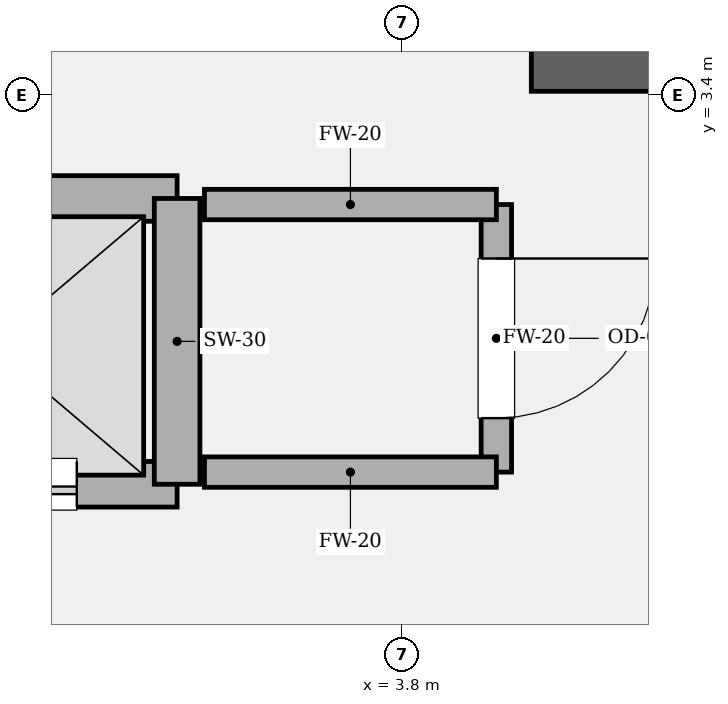
"""IFC4 building model, lengths in metres.
Left out: names, types, materials, properties, quantities, classifications, styles, units other than length and angle.
Written with IfcOpenShell. Run it as: python <this file> out.ifc"""

import sys

from ifc_helpers import new_model, si_unit, direction, frame, frame_2d, origin, place, context, subcontext, project, spatial, rectangle, extrude, element, fill, save


model = new_model("IFC4")
c1 = context("Model", 3, precision=1e-05, world=origin(), true_north=direction((0.0, 1.0)))
c2 = subcontext(c1, "Body", "Model", "MODEL_VIEW")
j1 = project(units=[si_unit("LENGTHUNIT", "METRE"), si_unit("PLANEANGLEUNIT", "RADIAN")], contexts=[c1])
p1 = place(None, origin())
s1 = spatial("IfcSite", under=j1, at=p1, CompositionType="ELEMENT")
p2 = place(p1, origin())
s2 = spatial("IfcBuilding", under=s1, at=p2, CompositionType="ELEMENT")
p3 = place(p2, frame((0.0, 0.0, 246.6)))
s3 = spatial("IfcBuildingStorey", under=s2, at=p3, CompositionType="ELEMENT", Elevation=246.6)
p4 = place(p3, frame((4.65, 3.6, 0.0), z_axis=(0.0, 0.0, 1.0), x_axis=(1.0, 0.0, 0.0)))
e1 = element("IfcWall", 1, at=p4, inside=s3, PredefinedType="SOLIDWALL", context=c2, shape_type="SweptSolid", body=[
    extrude(rectangle(XDim=5.275, YDim=0.35, at=frame_2d((2.638, 0.0))), origin(), (0.0, 0.0, 1.0), 4.8),
])
p5 = place(p3, frame((-2.32, 0.84, 0.0), z_axis=(0.0, 0.0, 1.0), x_axis=(1.0, 0.0, 0.0)))
e2 = element("IfcWall", 2, at=p5, inside=s3, PredefinedType="SOLIDWALL", context=c2, shape_type="SweptSolid", body=[
    extrude(rectangle(XDim=4.64, YDim=0.3, at=frame_2d((2.32, 0.0))), origin(), (0.0, 0.0, 1.0), 4.52),
])
p6 = place(p5, frame((0.66, 0.0, 0.0)))
e3 = element("IfcOpeningElement", 3, at=p6, cuts=e2, PredefinedType="OPENING", context=c2, shape_type="SweptSolid", body=[
    extrude(rectangle(XDim=1.12, YDim=2.25, at=frame_2d((0.56, 1.125))), frame((0.0, 0.16, 0.0), z_axis=(0.0, -1.0, 0.0), x_axis=(1.0, 0.0, 0.0)), (0.0, 0.0, 1.0), 0.32),
])
p7 = place(p5, frame((2.86, 0.0, 0.0)))
e4 = element("IfcOpeningElement", 4, at=p7, cuts=e2, PredefinedType="OPENING", context=c2, shape_type="SweptSolid", body=[
    extrude(rectangle(XDim=1.12, YDim=2.25, at=frame_2d((0.56, 1.125))), frame((0.0, 0.16, 0.0), z_axis=(0.0, -1.0, 0.0), x_axis=(1.0, 0.0, 0.0)), (0.0, 0.0, 1.0), 0.32),
])
p8 = place(p3, frame((-2.32, 2.72, 0.0), z_axis=(0.0, 0.0, 1.0), x_axis=(1.0, 0.0, 0.0)))
e5 = element("IfcWall", 5, at=p8, inside=s3, PredefinedType="SOLIDWALL", context=c2, shape_type="SweptSolid", body=[
    extrude(rectangle(XDim=4.64, YDim=0.3, at=frame_2d((2.32, 0.0))), origin(), (0.0, 0.0, 1.0), 4.52),
])
p9 = place(p3, frame((2.32, 0.84, 0.0), z_axis=(0.0, 0.0, 1.0), x_axis=(0.0, 1.0, 0.0)))
e6 = element("IfcWall", 6, at=p9, inside=s3, PredefinedType="SOLIDWALL", context=c2, shape_type="SweptSolid", body=[
    extrude(rectangle(XDim=1.88, YDim=0.3, at=frame_2d((0.94, 0.0))), origin(), (0.0, 0.0, 1.0), 4.52),
])
p10 = place(p3, frame((4.42, 0.92, 0.0), z_axis=(0.0, 0.0, 1.0), x_axis=(0.0, 1.0, 0.0)))
e7 = element("IfcWall", 7, at=p10, inside=s3, PredefinedType="SOLIDWALL", context=c2, shape_type="SweptSolid", body=[
    extrude(rectangle(XDim=1.76, YDim=0.2, at=frame_2d((0.88, 0.0))), origin(), (0.0, 0.0, 1.0), 4.52),
])
p11 = place(p10, frame((0.355, 0.0, 0.0)))
e8 = element("IfcOpeningElement", 8, at=p11, cuts=e7, PredefinedType="OPENING", context=c2, shape_type="SweptSolid", body=[
    extrude(rectangle(XDim=1.05, YDim=2.2, at=frame_2d((0.525, 1.1))), frame((0.0, 0.11, 0.0), z_axis=(0.0, -1.0, 0.0), x_axis=(1.0, 0.0, 0.0)), (0.0, 0.0, 1.0), 0.22),
])
for number, where, z_axis, x_axis in (
    (9, (4.42, 2.68, 0.0), (0.0, 0.0, 1.0), (-1.0, 0.0, 0.0)),
    (10, (2.5, 0.92, 0.0), (0.0, 0.0, 1.0), (1.0, 0.0, 0.0)),
):
    element("IfcWall", number, at=place(p3, frame(where, z_axis=z_axis, x_axis=x_axis)), inside=s3, PredefinedType="SOLIDWALL", context=c2, shape_type="SweptSolid", body=[
        extrude(rectangle(XDim=1.92, YDim=0.2, at=frame_2d((0.96, 0.0))), origin(), (0.0, 0.0, 1.0), 4.52),
    ])
p12 = place(p7, origin())
e11 = element("IfcDoor", 11, at=p12, inside=s3, OperationType="DOUBLE_DOOR_SLIDING", PredefinedType="DOOR", context=c2, shape_type="SweptSolid", body=[
    extrude(rectangle(XDim=1.12, YDim=2.25, at=frame_2d((0.56, 1.125))), frame((0.0, 0.025, 0.0), z_axis=(0.0, -1.0, 0.0), x_axis=(1.0, 0.0, 0.0)), (0.0, 0.0, 1.0), 0.05),
])
fill(e4, e11)
p13 = place(p11, origin())
e12 = element("IfcDoor", 12, at=p13, inside=s3, OperationType="SINGLE_SWING_RIGHT", PredefinedType="DOOR", context=c2, shape_type="SweptSolid", body=[
    extrude(rectangle(XDim=1.05, YDim=2.2, at=frame_2d((0.525, 1.1))), frame((0.0, 0.025, 0.0), z_axis=(0.0, -1.0, 0.0), x_axis=(1.0, 0.0, 0.0)), (0.0, 0.0, 1.0), 0.05),
])
fill(e8, e12)
save(model, sys.argv[1])
